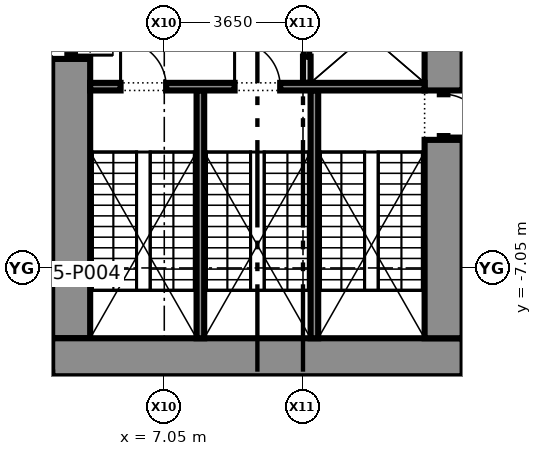
"""IFC4 building model, lengths in metres.
Left out: names, types, materials, properties, quantities, classifications, styles, units other than length and angle.
Written with IfcOpenShell. Run it as: python <this file> out.ifc"""

import sys

from ifc_helpers import new_model, si_unit, direction, frame, frame_2d, origin, place, context, subcontext, project, spatial, rectangle, extrude, element, fill, save


model = new_model("IFC4")
c1 = context("Model", 3, precision=1e-05, world=origin(), true_north=direction((0.0, 1.0)))
c2 = subcontext(c1, "Body", "Model", "MODEL_VIEW")
j1 = project(units=[si_unit("LENGTHUNIT", "METRE"), si_unit("PLANEANGLEUNIT", "RADIAN")], contexts=[c1])
p1 = place(None, origin())
s1 = spatial("IfcSite", under=j1, at=p1, CompositionType="ELEMENT")
p2 = place(p1, origin())
s2 = spatial("IfcBuilding", under=s1, at=p2, CompositionType="ELEMENT")
p3 = place(p2, frame((0.0, 0.0, 68.6)))
s3 = spatial("IfcBuildingStorey", under=s2, at=p3, CompositionType="ELEMENT", Elevation=68.6)
p4 = place(p3, frame((14.9, -9.4, 0.0), z_axis=(0.0, 0.0, 1.0), x_axis=(-1.0, 0.0, 0.0)))
e1 = element("IfcWall", 1, at=p4, inside=s3, PredefinedType="SHEAR", context=c2, shape_type="SweptSolid", body=[
    extrude(rectangle(XDim=10.8, YDim=1.0, at=frame_2d((5.4, 0.0))), origin(), (0.0, 0.0, 1.0), 4.4),
])
p5 = place(p3, frame((14.4, 3.75, 0.0), z_axis=(0.0, 0.0, 1.0), x_axis=(0.0, -1.0, 0.0)))
e2 = element("IfcWall", 2, at=p5, inside=s3, PredefinedType="SHEAR", context=c2, shape_type="SweptSolid", body=[
    extrude(rectangle(XDim=6.13, YDim=1.0, at=frame_2d((3.065, 0.0))), origin(), (0.0, 0.0, 1.0), 4.4),
])
p6 = place(p3, frame((14.4, -2.38, 0.0), z_axis=(0.0, 0.0, 1.0), x_axis=(0.0, -1.0, 0.0)))
e3 = element("IfcWall", 3, at=p6, inside=s3, PredefinedType="SHEAR", context=c2, shape_type="SweptSolid", body=[
    extrude(rectangle(XDim=1.3, YDim=0.2, at=frame_2d((0.65, 0.0))), origin(), (0.0, 0.0, 1.0), 2.4),
])
p7 = place(p6, frame((0.1, 0.0, 0.0)))
e4 = element("IfcOpeningElement", 4, at=p7, cuts=e3, PredefinedType="OPENING", context=c2, shape_type="SweptSolid", body=[
    extrude(rectangle(XDim=1.1, YDim=2.1, at=frame_2d((0.55, 1.05))), frame((0.0, 0.11, 0.0), z_axis=(0.0, -1.0, 0.0), x_axis=(1.0, 0.0, 0.0)), (0.0, 0.0, 1.0), 0.22),
])
p8 = place(p3, frame((14.4, -3.68, 0.0), z_axis=(0.0, 0.0, 1.0), x_axis=(0.0, -1.0, 0.0)))
e5 = element("IfcWall", 5, at=p8, inside=s3, PredefinedType="SHEAR", context=c2, shape_type="SweptSolid", body=[
    extrude(rectangle(XDim=5.22, YDim=1.0, at=frame_2d((2.61, 0.0))), origin(), (0.0, 0.0, 1.0), 4.4),
])
p9 = place(p3, frame((4.6, -0.25, 0.0), z_axis=(0.0, 0.0, 1.0), x_axis=(0.0, -1.0, 0.0)))
e6 = element("IfcWall", 6, at=p9, inside=s3, PredefinedType="PARTITIONING", context=c2, shape_type="SweptSolid", body=[
    extrude(rectangle(XDim=1.3, YDim=0.2, at=frame_2d((0.65, 0.0))), origin(), (0.0, 0.0, 1.0), 2.4),
])
p10 = place(p9, frame((0.1, 0.0, 0.0)))
e7 = element("IfcOpeningElement", 7, at=p10, cuts=e6, PredefinedType="OPENING", context=c2, shape_type="SweptSolid", body=[
    extrude(rectangle(XDim=1.1, YDim=2.1, at=frame_2d((0.55, 1.05))), frame((0.0, 0.11, 0.0), z_axis=(0.0, -1.0, 0.0), x_axis=(1.0, 0.0, 0.0)), (0.0, 0.0, 1.0), 0.22),
])
p11 = place(p3, frame((4.6, -1.55, 0.0), z_axis=(0.0, 0.0, 1.0), x_axis=(0.0, -1.0, 0.0)))
e8 = element("IfcWall", 8, at=p11, inside=s3, PredefinedType="SHEAR", context=c2, shape_type="SweptSolid", body=[
    extrude(rectangle(XDim=7.35, YDim=1.0, at=frame_2d((3.675, 0.0))), origin(), (0.0, 0.0, 1.0), 4.4),
])
p12 = place(p3, frame((10.8, 0.4, 0.0), z_axis=(0.0, 0.0, 1.0), x_axis=(0.0, -1.0, 0.0)))
e9 = element("IfcWall", 9, at=p12, inside=s3, PredefinedType="PARTITIONING", context=c2, shape_type="SweptSolid", body=[
    extrude(rectangle(XDim=2.58, YDim=0.2, at=frame_2d((1.29, 0.0))), origin(), (0.0, 0.0, 1.0), 4.4),
])
p13 = place(p12, frame((0.69, 0.0, 0.0)))
e10 = element("IfcOpeningElement", 10, at=p13, cuts=e9, PredefinedType="OPENING", context=c2, shape_type="SweptSolid", body=[
    extrude(rectangle(XDim=1.2, YDim=2.1, at=frame_2d((0.6, 1.05))), frame((0.0, 0.11, 0.0), z_axis=(0.0, -1.0, 0.0), x_axis=(1.0, 0.0, 0.0)), (0.0, 0.0, 1.0), 0.22),
])
p14 = place(p3, frame((13.9, -2.28, 0.0), z_axis=(0.0, 0.0, 1.0), x_axis=(-1.0, 0.0, 0.0)))
e11 = element("IfcWall", 11, at=p14, inside=s3, PredefinedType="SHEAR", context=c2, shape_type="SweptSolid", body=[
    extrude(rectangle(XDim=8.8, YDim=0.2, at=frame_2d((4.4, 0.0))), origin(), (0.0, 0.0, 1.0), 4.4),
])
p15 = place(p14, frame((3.8, 0.0, 0.0)))
e12 = element("IfcOpeningElement", 12, at=p15, cuts=e11, PredefinedType="OPENING", context=c2, shape_type="SweptSolid", body=[
    extrude(rectangle(XDim=1.2, YDim=2.1, at=frame_2d((0.6, 1.05))), frame((0.0, 0.11, 0.0), z_axis=(0.0, -1.0, 0.0), x_axis=(1.0, 0.0, 0.0)), (0.0, 0.0, 1.0), 0.22),
])
p16 = place(p14, frame((6.8, 0.0, 0.0)))
e13 = element("IfcOpeningElement", 13, at=p16, cuts=e11, PredefinedType="OPENING", context=c2, shape_type="SweptSolid", body=[
    extrude(rectangle(XDim=1.2, YDim=2.1, at=frame_2d((0.6, 1.05))), frame((0.0, 0.11, 0.0), z_axis=(0.0, -1.0, 0.0), x_axis=(1.0, 0.0, 0.0)), (0.0, 0.0, 1.0), 0.22),
])
for number, where, z_axis, x_axis in (
    (14, (11.0, -2.38, 0.0), (0.0, 0.0, 1.0), (0.0, -1.0, 0.0)),
    (15, (8.0, -2.38, 0.0), (0.0, 0.0, 1.0), (0.0, -1.0, 0.0)),
):
    element("IfcWall", number, at=place(p3, frame(where, z_axis=z_axis, x_axis=x_axis)), inside=s3, PredefinedType="SHEAR", context=c2, shape_type="SweptSolid", body=[
        extrude(rectangle(XDim=6.52, YDim=0.2, at=frame_2d((3.26, 0.0))), origin(), (0.0, 0.0, 1.0), 4.4),
    ])
p17 = place(p7, origin())
e16 = element("IfcDoor", 16, at=p17, inside=s3, OperationType="SINGLE_SWING_RIGHT", PredefinedType="DOOR", context=c2, shape_type="SweptSolid", body=[
    extrude(rectangle(XDim=1.1, YDim=2.1, at=frame_2d((0.55, 1.05))), frame((0.0, 0.025, 0.0), z_axis=(0.0, -1.0, 0.0), x_axis=(1.0, 0.0, 0.0)), (0.0, 0.0, 1.0), 0.05),
])
fill(e4, e16)
p18 = place(p10, origin())
e17 = element("IfcDoor", 17, at=p18, inside=s3, OperationType="SINGLE_SWING_RIGHT", PredefinedType="DOOR", context=c2, shape_type="SweptSolid", body=[
    extrude(rectangle(XDim=1.1, YDim=2.1, at=frame_2d((0.55, 1.05))), frame((0.0, 0.025, 0.0), z_axis=(0.0, -1.0, 0.0), x_axis=(1.0, 0.0, 0.0)), (0.0, 0.0, 1.0), 0.05),
])
fill(e7, e17)
p19 = place(p13, origin())
e18 = element("IfcDoor", 18, at=p19, inside=s3, OperationType="DOUBLE_DOOR_SLIDING", PredefinedType="DOOR", context=c2, shape_type="SweptSolid", body=[
    extrude(rectangle(XDim=1.2, YDim=2.1, at=frame_2d((0.6, 1.05))), frame((0.0, 0.025, 0.0), z_axis=(0.0, -1.0, 0.0), x_axis=(1.0, 0.0, 0.0)), (0.0, 0.0, 1.0), 0.05),
])
fill(e10, e18)
p20 = place(p15, frame((1.2, 0.0, 0.0), z_axis=(0.0, 0.0, 1.0), x_axis=(-1.0, 0.0, 0.0)))
e19 = element("IfcDoor", 19, at=p20, inside=s3, OperationType="SINGLE_SWING_LEFT", PredefinedType="DOOR", context=c2, shape_type="SweptSolid", body=[
    extrude(rectangle(XDim=1.2, YDim=2.1, at=frame_2d((0.6, 1.05))), frame((0.0, 0.025, 0.0), z_axis=(0.0, -1.0, 0.0), x_axis=(1.0, 0.0, 0.0)), (0.0, 0.0, 1.0), 0.05),
])
fill(e12, e19)
p21 = place(p16, frame((1.2, 0.0, 0.0), z_axis=(0.0, 0.0, 1.0), x_axis=(-1.0, 0.0, 0.0)))
e20 = element("IfcDoor", 20, at=p21, inside=s3, OperationType="SINGLE_SWING_LEFT", PredefinedType="DOOR", context=c2, shape_type="SweptSolid", body=[
    extrude(rectangle(XDim=1.2, YDim=2.1, at=frame_2d((0.6, 1.05))), frame((0.0, 0.025, 0.0), z_axis=(0.0, -1.0, 0.0), x_axis=(1.0, 0.0, 0.0)), (0.0, 0.0, 1.0), 0.05),
])
fill(e13, e20)
save(model, sys.argv[1])
